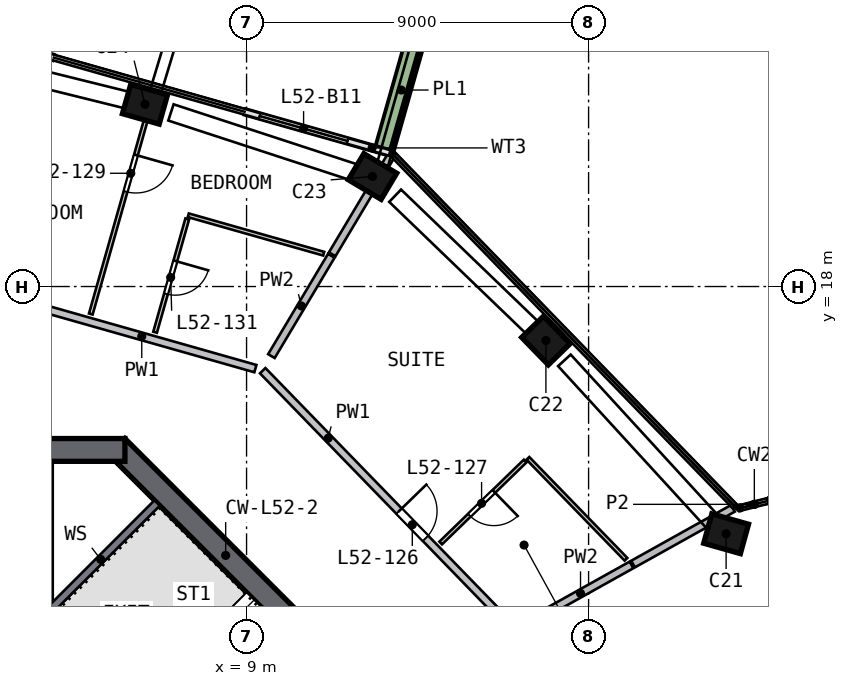
"""IFC4 building model, lengths in metres.
Left out: names, types, materials, properties, quantities, classifications, styles, units other than length and angle.
Written with IfcOpenShell. Run it as: python <this file> out.ifc"""

import sys

from ifc_helpers import new_model, si_unit, direction, frame, frame_2d, origin, origin_2d, place, context, subcontext, project, spatial, polyline, rectangle, outline, extrude, element, fill, save


model = new_model("IFC4")
c1 = context("Model", 3, precision=1e-05, world=origin(), true_north=direction((0.0, 1.0)))
c2 = subcontext(c1, "Body", "Model", "MODEL_VIEW")
j1 = project(units=[si_unit("LENGTHUNIT", "METRE"), si_unit("PLANEANGLEUNIT", "RADIAN")], contexts=[c1])
p1 = place(None, origin())
s1 = spatial("IfcSite", under=j1, at=p1, CompositionType="ELEMENT")
p2 = place(p1, origin())
s2 = spatial("IfcBuilding", under=s1, at=p2, CompositionType="ELEMENT")
p3 = place(p2, frame((0.0, 0.0, 212.5)))
s3 = spatial("IfcBuildingStorey", under=s2, at=p3, CompositionType="ELEMENT", Elevation=212.5)
p4 = place(p3, frame((21.685, 11.37, 0.0), z_axis=(-0.054962126, 0.102649853, 0.993197952), x_axis=(0.960807871, -0.265244303, 0.080583465)))
e1 = element("IfcColumn", 1, at=p4, inside=s3, PredefinedType="COLUMN", context=c2, shape_type="SweptSolid", body=[
    extrude(rectangle(XDim=1.0, YDim=0.8, at=origin_2d()), origin(), (0.0, 0.0, 1.0), 3.021),
])
p5 = place(p3, frame((16.972, 16.482, 0.0), z_axis=(-0.079084312, 0.080054672, 0.993648288), x_axis=(-0.692295124, 0.712786983, -0.112526346)))
e2 = element("IfcColumn", 2, at=p5, inside=s3, PredefinedType="COLUMN", context=c2, shape_type="SweptSolid", body=[
    extrude(rectangle(XDim=1.0, YDim=0.8, at=origin_2d()), origin(), (0.0, 0.0, 1.0), 3.019),
])
p6 = place(p3, frame((12.434, 20.825, 0.0), z_axis=(-0.099510649, 0.058283654, 0.993328066), x_axis=(0.852837949, -0.509282854, 0.115318722)))
e3 = element("IfcColumn", 3, at=p6, inside=s3, PredefinedType="COLUMN", context=c2, shape_type="SweptSolid", body=[
    extrude(rectangle(XDim=1.0, YDim=0.8, at=origin_2d()), origin(), (0.0, 0.0, 1.0), 3.02),
])
p7 = place(p3, frame((6.458, 22.76, 0.0), z_axis=(-0.108518363, 0.029838507, 0.993646531), x_axis=(-0.955819005, 0.271559126, -0.112541864)))
e4 = element("IfcColumn", 4, at=p7, inside=s3, PredefinedType="COLUMN", context=c2, shape_type="SweptSolid", body=[
    extrude(rectangle(XDim=1.0, YDim=0.8, at=origin_2d()), origin(), (0.0, 0.0, 1.0), 3.019),
])
p8 = place(p3, frame((13.788, 5.587, 0.0), z_axis=(0.0, 0.0, 1.0), x_axis=(-0.707106781, 0.707106781, 0.0)))
e5 = element("IfcWall", 5, at=p8, inside=s3, PredefinedType="SHEAR", context=c2, shape_type="SweptSolid", body=[
    extrude(rectangle(XDim=11.598, YDim=0.6, at=frame_2d((5.799, 0.0))), origin(), (0.0, 0.0, 1.0), 3.5),
])
p9 = place(p8, frame((2.099, 0.0, 0.0)))
e6 = element("IfcOpeningElement", 6, at=p9, cuts=e5, PredefinedType="OPENING", context=c2, shape_type="SweptSolid", body=[
    extrude(rectangle(XDim=1.2, YDim=2.1, at=frame_2d((0.6, 1.05))), frame((0.0, 0.31, 0.0), z_axis=(0.0, -1.0, 0.0), x_axis=(1.0, 0.0, 0.0)), (0.0, 0.0, 1.0), 0.62),
])
p10 = place(p3, frame((5.799, 13.7, 0.0), z_axis=(0.0, 0.0, 1.0), x_axis=(-1.0, 0.0, 0.0)))
e7 = element("IfcWall", 7, at=p10, inside=s3, PredefinedType="SHEAR", context=c2, shape_type="SweptSolid", body=[
    extrude(rectangle(XDim=11.598, YDim=0.6, at=frame_2d((5.799, 0.0))), origin(), (0.0, 0.0, 1.0), 3.5),
])
p11 = place(p10, frame((4.899, 0.0, 0.0)))
e8 = element("IfcOpeningElement", 8, at=p11, cuts=e7, PredefinedType="OPENING", context=c2, shape_type="SweptSolid", body=[
    extrude(rectangle(XDim=1.8, YDim=2.1, at=frame_2d((0.9, 1.05))), frame((0.0, 0.31, 0.0), z_axis=(0.0, -1.0, 0.0), x_axis=(1.0, 0.0, 0.0)), (0.0, 0.0, 1.0), 0.62),
])
p12 = place(p3, frame((12.758, 21.518, 0.0), z_axis=(0.0, 0.0, 1.0), x_axis=(-0.962033627, 0.272930945, 0.0)))
e9 = element("IfcWall", 9, at=p12, inside=s3, PredefinedType="SOLIDWALL", context=c2, shape_type="SweptSolid", body=[
    extrude(rectangle(XDim=3.946, YDim=0.15, at=frame_2d((1.973, 0.0))), origin(), (0.0, 0.0, 1.0), 2.935),
])
p13 = place(p12, frame((1.146, 0.0, 0.0)))
e10 = element("IfcOpeningElement", 10, at=p13, cuts=e9, PredefinedType="OPENING", context=c2, shape_type="SweptSolid", body=[
    extrude(rectangle(XDim=2.4, YDim=2.4, at=frame_2d((1.2, 1.2))), frame((0.0, 0.085, 0.0), z_axis=(0.0, -1.0, 0.0), x_axis=(1.0, 0.0, 0.0)), (0.0, 0.0, 1.0), 0.17),
])
p14 = place(p3, frame((3.916, 24.027, 0.0), z_axis=(0.0, 0.0, 1.0), x_axis=(-0.96202019, 0.272978303, 0.0)))
e11 = element("IfcWall", 11, at=p14, inside=s3, PredefinedType="SOLIDWALL", context=c2, shape_type="SweptSolid", body=[
    extrude(rectangle(XDim=3.609, YDim=0.15, at=frame_2d((1.804, 0.0))), origin(), (0.0, 0.0, 1.0), 2.935),
])
p15 = place(p14, frame((0.4, 0.0, 0.0)))
e12 = element("IfcOpeningElement", 12, at=p15, cuts=e11, PredefinedType="OPENING", context=c2, shape_type="SweptSolid", body=[
    extrude(rectangle(XDim=2.4, YDim=2.4, at=frame_2d((1.2, 1.2))), frame((0.0, 0.085, 0.0), z_axis=(0.0, -1.0, 0.0), x_axis=(1.0, 0.0, 0.0)), (0.0, 0.0, 1.0), 0.17),
])
p16 = place(p3, frame((12.634, 21.632, 0.0), z_axis=(0.0, 0.0, 1.0), x_axis=(0.272976962, 0.962020571, 0.0)))
e13 = element("IfcWall", 13, at=p16, inside=s3, PredefinedType="SOLIDWALL", context=c2, shape_type="SweptSolid", body=[
    extrude(rectangle(XDim=3.199, YDim=0.5, at=frame_2d((1.6, 0.0))), origin(), (0.0, 0.0, 1.0), 0.7),
])
p17 = place(p3, origin())
e14 = element("IfcWall", 14, at=p17, inside=s3, PredefinedType="SOLIDWALL", context=c2, shape_type="SweptSolid", body=[
    extrude(outline(polyline([(3.9, 9.9), (3.7, 9.9), (3.7, 12.9), (1.4, 12.9), (1.4, 9.9), (1.2, 9.9), (1.2, 13.4), (3.9, 13.4), (3.9, 9.9)])), origin(), (0.0, 0.0, 1.0), 3.0),
])
p18 = place(p3, frame((1.2, 9.8, 0.0), z_axis=(0.0, 0.0, 1.0), x_axis=(1.0, 0.0, 0.0)))
e15 = element("IfcWall", 15, at=p18, inside=s3, PredefinedType="SOLIDWALL", context=c2, shape_type="SweptSolid", body=[
    extrude(rectangle(XDim=2.7, YDim=0.2, at=frame_2d((1.35, 0.0))), origin(), (0.0, 0.0, 1.0), 3.0),
])
p19 = place(p18, frame((0.75, 0.0, 0.0)))
e16 = element("IfcOpeningElement", 16, at=p19, cuts=e15, PredefinedType="OPENING", context=c2, shape_type="SweptSolid", body=[
    extrude(rectangle(XDim=1.2, YDim=2.1, at=frame_2d((0.6, 1.05))), frame((0.0, 0.11, 0.0), z_axis=(0.0, -1.0, 0.0), x_axis=(1.0, 0.0, 0.0)), (0.0, 0.0, 1.0), 0.22),
])
p20 = place(p3, frame((3.24, 9.629, 0.0), z_axis=(0.0, 0.0, 1.0), x_axis=(0.707106781, -0.707106781, 0.0)))
e17 = element("IfcWall", 17, at=p20, inside=s3, PredefinedType="SOLIDWALL", context=c2, shape_type="SweptSolid", body=[
    extrude(rectangle(XDim=9.036, YDim=0.2, at=frame_2d((4.518, 0.0))), origin(), (0.0, 0.0, 1.0), 3.0),
])
p21 = place(p20, frame((7.018, 0.0, 0.0)))
e18 = element("IfcOpeningElement", 18, at=p21, cuts=e17, PredefinedType="OPENING", context=c2, shape_type="SweptSolid", body=[
    extrude(rectangle(XDim=1.2, YDim=2.1, at=frame_2d((0.6, 1.05))), frame((0.0, 0.11, 0.0), z_axis=(0.0, -1.0, 0.0), x_axis=(1.0, 0.0, 0.0)), (0.0, 0.0, 1.0), 0.22),
])
p22 = place(p3, frame((3.677, 9.334, 0.0), z_axis=(0.0, 0.0, 1.0), x_axis=(0.707077716, 0.707135845, 0.0)))
e19 = element("IfcWall", 19, at=p22, inside=s3, PredefinedType="SOLIDWALL", context=c2, shape_type="SweptSolid", body=[
    extrude(rectangle(XDim=4.2, YDim=0.2, at=frame_2d((2.1, 0.0))), origin(), (0.0, 0.0, 1.0), 3.0),
])
p23 = place(p3, frame((0.27, 18.383, 0.0), z_axis=(0.0, 0.0, 1.0), x_axis=(0.96202861, -0.272948627, 0.0)))
e20 = element("IfcWall", 20, at=p23, inside=s3, PredefinedType="SOLIDWALL", context=c2, shape_type="SweptSolid", body=[
    extrude(rectangle(XDim=9.317, YDim=0.2, at=frame_2d((4.658, 0.0))), origin(), (0.0, 0.0, 1.0), 3.0),
])
p24 = place(p23, frame((1.9, 0.0, 0.0)))
e21 = element("IfcOpeningElement", 21, at=p24, cuts=e20, PredefinedType="OPENING", context=c2, shape_type="SweptSolid", body=[
    extrude(rectangle(XDim=1.0, YDim=2.1, at=frame_2d((0.5, 1.05))), frame((0.0, 0.11, 0.0), z_axis=(0.0, -1.0, 0.0), x_axis=(1.0, 0.0, 0.0)), (0.0, 0.0, 1.0), 0.22),
])
p25 = place(p3, frame((9.425, 15.785, 0.0), z_axis=(0.0, 0.0, 1.0), x_axis=(0.696666645, -0.717395, 0.0)))
e22 = element("IfcWall", 22, at=p25, inside=s3, PredefinedType="SOLIDWALL", context=c2, shape_type="SweptSolid", body=[
    extrude(rectangle(XDim=9.316, YDim=0.2, at=frame_2d((4.658, 0.0))), origin(), (0.0, 0.0, 1.0), 3.0),
])
p26 = place(p25, frame((5.15, 0.0, 0.0)))
e23 = element("IfcOpeningElement", 23, at=p26, cuts=e22, PredefinedType="OPENING", context=c2, shape_type="SweptSolid", body=[
    extrude(rectangle(XDim=1.0, YDim=2.1, at=frame_2d((0.5, 1.05))), frame((0.0, 0.11, 0.0), z_axis=(0.0, -1.0, 0.0), x_axis=(1.0, 0.0, 0.0)), (0.0, 0.0, 1.0), 0.22),
])
p27 = place(p3, frame((9.654, 16.169, 0.0), z_axis=(0.0, 0.0, 1.0), x_axis=(0.512637877, 0.858604919, 0.0)))
e24 = element("IfcWall", 24, at=p27, inside=s3, PredefinedType="SOLIDWALL", context=c2, shape_type="SweptSolid", body=[
    extrude(rectangle(XDim=3.075, YDim=0.2, at=frame_2d((1.537, 0.0))), origin(), (0.0, 0.0, 1.0), 3.0),
])
p28 = place(p3, frame((11.254, 18.849, 0.0), z_axis=(0.0, 0.0, 1.0), x_axis=(0.512646494, 0.858599774, 0.0)))
e25 = element("IfcWall", 25, at=p28, inside=s3, PredefinedType="SOLIDWALL", context=c2, shape_type="SweptSolid", body=[
    extrude(rectangle(XDim=3.011, YDim=0.2, at=frame_2d((1.506, 0.0))), origin(), (0.0, 0.0, 1.0), 3.0),
])
p29 = place(p3, frame((16.445, 9.176, 0.0), z_axis=(0.0, 0.0, 1.0), x_axis=(0.873245633, 0.487280274, 0.0)))
e26 = element("IfcWall", 26, at=p29, inside=s3, PredefinedType="SOLIDWALL", context=c2, shape_type="SweptSolid", body=[
    extrude(rectangle(XDim=3.075, YDim=0.2, at=frame_2d((1.537, 0.0))), origin(), (0.0, 0.0, 1.0), 3.0),
])
p30 = place(p3, frame((19.17, 10.696, 0.0), z_axis=(0.0, 0.0, 1.0), x_axis=(0.873241825, 0.487287097, 0.0)))
e27 = element("IfcWall", 27, at=p30, inside=s3, PredefinedType="SOLIDWALL", context=c2, shape_type="SweptSolid", body=[
    extrude(rectangle(XDim=3.012, YDim=0.2, at=frame_2d((1.506, 0.0))), origin(), (0.0, 0.0, 1.0), 3.0),
])
p31 = place(p3, frame((6.58, 23.193, 0.0), z_axis=(0.0, 0.0, 1.0), x_axis=(-0.272922263, -0.96203609, 0.0)))
e28 = element("IfcWall", 28, at=p31, inside=s3, PredefinedType="PARTITIONING", context=c2, shape_type="SweptSolid", body=[
    extrude(rectangle(XDim=6.15, YDim=0.1, at=frame_2d((3.075, 0.0))), origin(), (0.0, 0.0, 1.0), 3.0),
])
p32 = place(p31, frame((1.8, 0.0, 0.0)))
e29 = element("IfcOpeningElement", 29, at=p32, cuts=e28, PredefinedType="OPENING", context=c2, shape_type="SweptSolid", body=[
    extrude(rectangle(XDim=1.0, YDim=2.1, at=frame_2d((0.5, 1.05))), frame((0.0, 0.06, 0.0), z_axis=(0.0, -1.0, 0.0), x_axis=(1.0, 0.0, 0.0)), (0.0, 0.0, 1.0), 0.12),
])
p33 = place(p3, frame((7.439, 19.779, 0.0), z_axis=(0.0, 0.0, 1.0), x_axis=(-0.272952471, -0.96202752, 0.0)))
e30 = element("IfcWall", 30, at=p33, inside=s3, PredefinedType="PARTITIONING", context=c2, shape_type="SweptSolid", body=[
    extrude(rectangle(XDim=3.1, YDim=0.1, at=frame_2d((1.55, 0.0))), origin(), (0.0, 0.0, 1.0), 3.0),
])
p34 = place(p33, frame((1.15, 0.0, 0.0)))
e31 = element("IfcOpeningElement", 31, at=p34, cuts=e30, PredefinedType="OPENING", context=c2, shape_type="SweptSolid", body=[
    extrude(rectangle(XDim=0.9, YDim=2.1, at=frame_2d((0.45, 1.05))), frame((0.0, 0.06, 0.0), z_axis=(0.0, -1.0, 0.0), x_axis=(1.0, 0.0, 0.0)), (0.0, 0.0, 1.0), 0.12),
])
p35 = place(p3, frame((11.03, 18.864, 0.0), z_axis=(0.0, 0.0, 1.0), x_axis=(-0.962027256, 0.2729534, 0.0)))
e32 = element("IfcWall", 32, at=p35, inside=s3, PredefinedType="PARTITIONING", context=c2, shape_type="SweptSolid", body=[
    extrude(rectangle(XDim=3.704, YDim=0.1, at=frame_2d((1.852, 0.0))), origin(), (0.0, 0.0, 1.0), 3.0),
])
p36 = place(p3, frame((16.332, 13.409, 0.0), z_axis=(0.0, 0.0, 1.0), x_axis=(-0.717425556, -0.696635178, 0.0)))
e33 = element("IfcWall", 33, at=p36, inside=s3, PredefinedType="PARTITIONING", context=c2, shape_type="SweptSolid", body=[
    extrude(rectangle(XDim=3.1, YDim=0.1, at=frame_2d((1.55, 0.0))), origin(), (0.0, 0.0, 1.0), 3.0),
])
p37 = place(p36, frame((1.15, 0.0, 0.0)))
e34 = element("IfcOpeningElement", 34, at=p37, cuts=e33, PredefinedType="OPENING", context=c2, shape_type="SweptSolid", body=[
    extrude(rectangle(XDim=0.9, YDim=2.1, at=frame_2d((0.45, 1.05))), frame((0.0, 0.06, 0.0), z_axis=(0.0, -1.0, 0.0), x_axis=(1.0, 0.0, 0.0)), (0.0, 0.0, 1.0), 0.12),
])
p38 = place(p3, frame((16.404, 13.479, 0.0), z_axis=(0.0, 0.0, 1.0), x_axis=(0.696682976, -0.71737914, 0.0)))
e35 = element("IfcWall", 35, at=p38, inside=s3, PredefinedType="PARTITIONING", context=c2, shape_type="SweptSolid", body=[
    extrude(rectangle(XDim=3.704, YDim=0.1, at=frame_2d((1.852, 0.0))), origin(), (0.0, 0.0, 1.0), 3.0),
])
p39 = place(p13, origin())
e36 = element("IfcDoor", 36, at=p39, inside=s3, OperationType="SLIDING_TO_LEFT", PredefinedType="DOOR", context=c2, shape_type="SweptSolid", body=[
    extrude(rectangle(XDim=2.4, YDim=2.4, at=frame_2d((1.2, 1.2))), frame((0.0, 0.025, 0.0), z_axis=(0.0, -1.0, 0.0), x_axis=(1.0, 0.0, 0.0)), (0.0, 0.0, 1.0), 0.05),
])
fill(e10, e36)
p40 = place(p26, origin())
e37 = element("IfcDoor", 37, at=p40, inside=s3, OperationType="SINGLE_SWING_LEFT", PredefinedType="DOOR", context=c2, shape_type="SweptSolid", body=[
    extrude(rectangle(XDim=1.0, YDim=2.1, at=frame_2d((0.5, 1.05))), frame((0.0, 0.025, 0.0), z_axis=(0.0, -1.0, 0.0), x_axis=(1.0, 0.0, 0.0)), (0.0, 0.0, 1.0), 0.05),
])
fill(e23, e37)
p41 = place(p37, origin())
e38 = element("IfcDoor", 38, at=p41, inside=s3, OperationType="SINGLE_SWING_LEFT", PredefinedType="DOOR", context=c2, shape_type="SweptSolid", body=[
    extrude(rectangle(XDim=0.9, YDim=2.1, at=frame_2d((0.45, 1.05))), frame((0.0, 0.025, 0.0), z_axis=(0.0, -1.0, 0.0), x_axis=(1.0, 0.0, 0.0)), (0.0, 0.0, 1.0), 0.05),
])
fill(e34, e38)
p42 = place(p32, origin())
e39 = element("IfcDoor", 39, at=p42, inside=s3, OperationType="SINGLE_SWING_LEFT", PredefinedType="DOOR", context=c2, shape_type="SweptSolid", body=[
    extrude(rectangle(XDim=1.0, YDim=2.1, at=frame_2d((0.5, 1.05))), frame((0.0, 0.025, 0.0), z_axis=(0.0, -1.0, 0.0), x_axis=(1.0, 0.0, 0.0)), (0.0, 0.0, 1.0), 0.05),
])
fill(e29, e39)
p43 = place(p34, origin())
e40 = element("IfcDoor", 40, at=p43, inside=s3, OperationType="SINGLE_SWING_LEFT", PredefinedType="DOOR", context=c2, shape_type="SweptSolid", body=[
    extrude(rectangle(XDim=0.9, YDim=2.1, at=frame_2d((0.45, 1.05))), frame((0.0, 0.025, 0.0), z_axis=(0.0, -1.0, 0.0), x_axis=(1.0, 0.0, 0.0)), (0.0, 0.0, 1.0), 0.05),
])
fill(e31, e40)
save(model, sys.argv[1])
